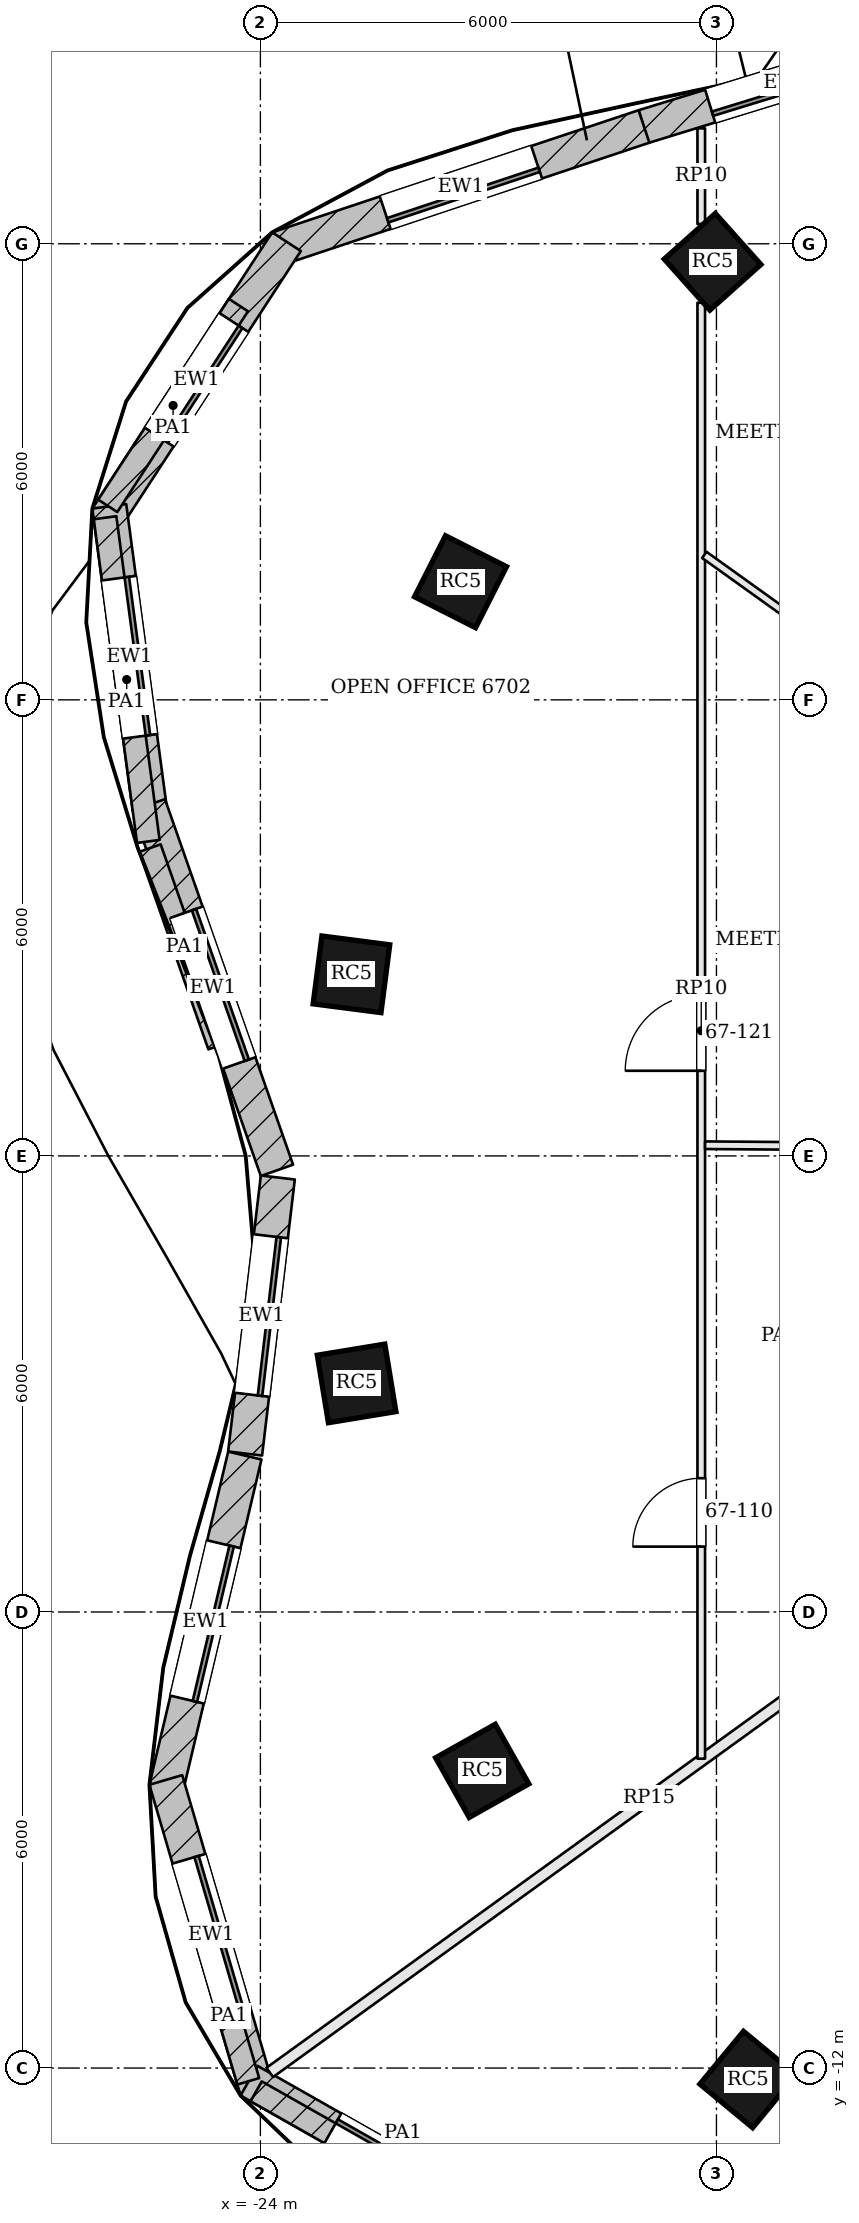
"""IFC4 building model, lengths in metres.
Left out: names, types, materials, properties, quantities, classifications, styles, units other than length and angle.
Written with IfcOpenShell. Run it as: python <this file> out.ifc"""

import sys

from ifc_helpers import new_model, si_unit, direction, frame, frame_2d, origin, origin_2d, place, context, subcontext, project, spatial, rectangle, extrude, element, fill, save


model = new_model("IFC4")
c1 = context("Model", 3, precision=1e-05, world=origin(), true_north=direction((0.0, 1.0)))
c2 = subcontext(c1, "Body", "Model", "MODEL_VIEW")
j1 = project(units=[si_unit("LENGTHUNIT", "METRE"), si_unit("PLANEANGLEUNIT", "RADIAN")], contexts=[c1])
p1 = place(None, origin())
s1 = spatial("IfcSite", under=j1, at=p1, CompositionType="ELEMENT")
p2 = place(p1, origin())
s2 = spatial("IfcBuilding", under=s1, at=p2, CompositionType="ELEMENT")
p3 = place(p2, frame((0.0, 0.0, 272.7)))
s3 = spatial("IfcBuildingStorey", under=s2, at=p3, CompositionType="ELEMENT", Elevation=272.7)
for number, where, z_axis, x_axis in (
    (1, (-18.051, 11.763, 0.0), (0.0, 0.0, 1.0), (-0.746, -0.666, 0.0)),
    (2, (-21.367, 7.554, 0.0), (0.0, 0.0, 1.0), (-0.452, -0.892, 0.0)),
    (3, (-22.802, 2.389, 0.0), (0.0, 0.0, 1.0), (-0.129, -0.992, 0.0)),
    (4, (-22.734, -2.993, 0.0), (0.0, 0.0, 1.0), (0.162, -0.987, 0.0)),
    (5, (-21.081, -8.09, 0.0), (0.0, 0.0, 1.0), (0.49, -0.872, 0.0)),
    (6, (-17.584, -12.151, 0.0), (0.0, 0.0, 1.0), (0.771, -0.637, 0.0)),
):
    element("IfcColumn", number, at=place(p3, frame(where, z_axis=z_axis, x_axis=x_axis)), inside=s3, PredefinedType="COLUMN", context=c2, shape_type="SweptSolid", body=[
        extrude(rectangle(XDim=0.9, YDim=0.9, at=origin_2d()), origin(), (0.0, 0.0, 1.0), 3.9),
    ])
p4 = place(p3, frame((-15.2, 14.698, 0.0), z_axis=(0.0, 0.0, 1.0), x_axis=(-0.955797807378, -0.294024746256, 0.0)))
e7 = element("IfcWall", 7, at=p4, inside=s3, PredefinedType="SOLIDWALL", context=c2, shape_type="SweptSolid", body=[
    extrude(rectangle(XDim=3.931, YDim=0.45, at=frame_2d((1.965, 0.0))), origin(), (0.0, 0.0, 1.0), 3.7),
])
p5 = place(p4, frame((0.915, 0.0, 0.9)))
e8 = element("IfcOpeningElement", 8, at=p5, cuts=e7, PredefinedType="OPENING", context=c2, shape_type="SweptSolid", body=[
    extrude(rectangle(XDim=2.1, YDim=2.3, at=frame_2d((1.05, 1.15))), frame((0.0, 0.235, 0.0), z_axis=(0.0, -1.0, 0.0), x_axis=(1.0, 0.0, 0.0)), (0.0, 0.0, 1.0), 0.47),
])
p6 = place(p3, frame((-18.954, 13.543, 0.0), z_axis=(0.0, 0.0, 1.0), x_axis=(-0.948673679101, -0.316256621402, 0.0)))
e9 = element("IfcWall", 9, at=p6, inside=s3, PredefinedType="SOLIDWALL", context=c2, shape_type="SweptSolid", body=[
    extrude(rectangle(XDim=5.076, YDim=0.45, at=frame_2d((2.538, 0.0))), origin(), (0.0, 0.0, 1.0), 3.7),
])
p7 = place(p6, frame((1.488, 0.0, 0.9)))
e10 = element("IfcOpeningElement", 10, at=p7, cuts=e9, PredefinedType="OPENING", context=c2, shape_type="SweptSolid", body=[
    extrude(rectangle(XDim=2.1, YDim=2.3, at=frame_2d((1.05, 1.15))), frame((0.0, 0.235, 0.0), z_axis=(0.0, -1.0, 0.0), x_axis=(1.0, 0.0, 0.0)), (0.0, 0.0, 1.0), 0.47),
])
p8 = place(p3, frame((-23.656, 12.027, 0.0), z_axis=(0.0, 0.0, 1.0), x_axis=(-0.545637310328, -0.838021435035, 0.0)))
e11 = element("IfcWall", 11, at=p8, inside=s3, PredefinedType="SOLIDWALL", context=c2, shape_type="SweptSolid", body=[
    extrude(rectangle(XDim=4.336, YDim=0.45, at=frame_2d((2.168, 0.0))), origin(), (0.0, 0.0, 1.0), 3.7),
])
p9 = place(p8, frame((1.268, 0.0, 0.9)))
e12 = element("IfcOpeningElement", 12, at=p9, cuts=e11, PredefinedType="OPENING", context=c2, shape_type="SweptSolid", body=[
    extrude(rectangle(XDim=1.8, YDim=2.3, at=frame_2d((0.9, 1.15))), frame((0.0, 0.235, 0.0), z_axis=(0.0, -1.0, 0.0), x_axis=(1.0, 0.0, 0.0)), (0.0, 0.0, 1.0), 0.47),
])
p10 = place(p3, frame((-25.988, 8.546, 0.0), z_axis=(0.0, 0.0, 1.0), x_axis=(0.132518904574, -0.991180477981, 0.0)))
e13 = element("IfcWall", 13, at=p10, inside=s3, PredefinedType="SOLIDWALL", context=c2, shape_type="SweptSolid", body=[
    extrude(rectangle(XDim=4.007, YDim=0.45, at=frame_2d((2.003, 0.0))), origin(), (0.0, 0.0, 1.0), 3.7),
])
p11 = place(p10, frame((0.954, 0.0, 0.9)))
e14 = element("IfcOpeningElement", 14, at=p11, cuts=e13, PredefinedType="OPENING", context=c2, shape_type="SweptSolid", body=[
    extrude(rectangle(XDim=2.1, YDim=2.3, at=frame_2d((1.05, 1.15))), frame((0.0, 0.235, 0.0), z_axis=(0.0, -1.0, 0.0), x_axis=(1.0, 0.0, 0.0)), (0.0, 0.0, 1.0), 0.47),
])
p12 = place(p3, frame((-25.468, 4.619, 0.0), z_axis=(0.0, 0.0, 1.0), x_axis=(0.330751636181, -0.943717836625, 0.0)))
e15 = element("IfcWall", 15, at=p12, inside=s3, PredefinedType="SOLIDWALL", context=c2, shape_type="SweptSolid", body=[
    extrude(rectangle(XDim=5.095, YDim=0.45, at=frame_2d((2.548, 0.0))), origin(), (0.0, 0.0, 1.0), 3.7),
])
p13 = place(p12, frame((1.498, 0.0, 0.9)))
e16 = element("IfcOpeningElement", 16, at=p13, cuts=e15, PredefinedType="OPENING", context=c2, shape_type="SweptSolid", body=[
    extrude(rectangle(XDim=2.1, YDim=2.3, at=frame_2d((1.05, 1.15))), frame((0.0, 0.235, 0.0), z_axis=(0.0, -1.0, 0.0), x_axis=(1.0, 0.0, 0.0)), (0.0, 0.0, 1.0), 0.47),
])
p14 = place(p3, frame((-23.771, -0.284, 0.0), z_axis=(0.0, 0.0, 1.0), x_axis=(-0.11770503458, -0.993048601446, 0.0)))
e17 = element("IfcWall", 17, at=p14, inside=s3, PredefinedType="SOLIDWALL", context=c2, shape_type="SweptSolid", body=[
    extrude(rectangle(XDim=3.657, YDim=0.45, at=frame_2d((1.828, 0.0))), origin(), (0.0, 0.0, 1.0), 3.7),
])
p15 = place(p14, frame((0.778, 0.0, 0.9)))
e18 = element("IfcOpeningElement", 18, at=p15, cuts=e17, PredefinedType="OPENING", context=c2, shape_type="SweptSolid", body=[
    extrude(rectangle(XDim=2.1, YDim=2.3, at=frame_2d((1.05, 1.15))), frame((0.0, 0.235, 0.0), z_axis=(0.0, -1.0, 0.0), x_axis=(1.0, 0.0, 0.0)), (0.0, 0.0, 1.0), 0.47),
])
p16 = place(p3, frame((-24.205, -3.942, 0.0), z_axis=(0.0, 0.0, 1.0), x_axis=(-0.230089011282, -0.973169587938, 0.0)))
e19 = element("IfcWall", 19, at=p16, inside=s3, PredefinedType="SOLIDWALL", context=c2, shape_type="SweptSolid", body=[
    extrude(rectangle(XDim=4.498, YDim=0.45, at=frame_2d((2.249, 0.0))), origin(), (0.0, 0.0, 1.0), 3.7),
])
p17 = place(p16, frame((1.199, 0.0, 0.9)))
e20 = element("IfcOpeningElement", 20, at=p17, cuts=e19, PredefinedType="OPENING", context=c2, shape_type="SweptSolid", body=[
    extrude(rectangle(XDim=2.1, YDim=2.3, at=frame_2d((1.05, 1.15))), frame((0.0, 0.235, 0.0), z_axis=(0.0, -1.0, 0.0), x_axis=(1.0, 0.0, 0.0)), (0.0, 0.0, 1.0), 0.47),
])
p18 = place(p3, frame((-25.244, -8.21, 0.0), z_axis=(0.0, 0.0, 1.0), x_axis=(0.281381418228, -0.95959600743, 0.0)))
e21 = element("IfcWall", 21, at=p18, inside=s3, PredefinedType="SOLIDWALL", context=c2, shape_type="SweptSolid", body=[
    extrude(rectangle(XDim=4.261, YDim=0.45, at=frame_2d((2.13, 0.0))), origin(), (0.0, 0.0, 1.0), 3.7),
])
p19 = place(p18, frame((1.081, 0.0, 0.9)))
e22 = element("IfcOpeningElement", 22, at=p19, cuts=e21, PredefinedType="OPENING", context=c2, shape_type="SweptSolid", body=[
    extrude(rectangle(XDim=2.1, YDim=2.3, at=frame_2d((1.05, 1.15))), frame((0.0, 0.235, 0.0), z_axis=(0.0, -1.0, 0.0), x_axis=(1.0, 0.0, 0.0)), (0.0, 0.0, 1.0), 0.47),
])
p20 = place(p3, frame((-24.15, -12.166, 0.0), z_axis=(0.0, 0.0, 1.0), x_axis=(0.869797051289, -0.493409656947, 0.0)))
e23 = element("IfcWall", 23, at=p20, inside=s3, PredefinedType="SOLIDWALL", context=c2, shape_type="SweptSolid", body=[
    extrude(rectangle(XDim=4.638, YDim=0.45, at=frame_2d((2.319, 0.0))), origin(), (0.0, 0.0, 1.0), 3.7),
])
p21 = place(p20, frame((1.269, 0.0, 0.9)))
e24 = element("IfcOpeningElement", 24, at=p21, cuts=e23, PredefinedType="OPENING", context=c2, shape_type="SweptSolid", body=[
    extrude(rectangle(XDim=2.1, YDim=2.3, at=frame_2d((1.05, 1.15))), frame((0.0, 0.235, 0.0), z_axis=(0.0, -1.0, 0.0), x_axis=(1.0, 0.0, 0.0)), (0.0, 0.0, 1.0), 0.47),
])
p22 = place(p3, frame((-24.289, 11.193, 3.9), z_axis=(0.0, 0.0, 1.0), x_axis=(-0.545639010101, -0.838020328307, 0.0)))
e25 = element("IfcWall", 25, at=p22, inside=s3, PredefinedType="PARAPET", context=c2, shape_type="SweptSolid", body=[
    extrude(rectangle(XDim=3.151, YDim=0.3, at=frame_2d((1.576, 0.0))), origin(), (0.0, 0.0, 1.0), 1.1),
])
p23 = place(p3, frame((-26.044, 8.396, 3.9), z_axis=(0.0, 0.0, 1.0), x_axis=(0.132506125812, -0.991182186393, 0.0)))
e26 = element("IfcWall", 26, at=p23, inside=s3, PredefinedType="PARAPET", context=c2, shape_type="SweptSolid", body=[
    extrude(rectangle(XDim=4.297, YDim=0.3, at=frame_2d((2.148, 0.0))), origin(), (0.0, 0.0, 1.0), 1.1),
])
p24 = place(p3, frame((-25.453, 4.049, 3.9), z_axis=(0.0, 0.0, 1.0), x_axis=(0.330796777865, -0.943702014279, 0.0)))
e27 = element("IfcWall", 27, at=p24, inside=s3, PredefinedType="PARAPET", context=c2, shape_type="SweptSolid", body=[
    extrude(rectangle(XDim=2.753, YDim=0.3, at=frame_2d((1.376, 0.0))), origin(), (0.0, 0.0, 1.0), 1.1),
])
p25 = place(p3, frame((-24.666, -10.449, 3.9), z_axis=(0.0, 0.0, 1.0), x_axis=(0.281438565612, -0.95957924831, 0.0)))
e28 = element("IfcWall", 28, at=p25, inside=s3, PredefinedType="PARAPET", context=c2, shape_type="SweptSolid", body=[
    extrude(rectangle(XDim=1.798, YDim=0.3, at=frame_2d((0.899, 0.0))), origin(), (0.0, 0.0, 1.0), 1.1),
])
p26 = place(p3, frame((-24.055, -12.306, 3.9), z_axis=(0.0, 0.0, 1.0), x_axis=(0.86982311217, -0.493363713234, 0.0)))
e29 = element("IfcWall", 29, at=p26, inside=s3, PredefinedType="PARAPET", context=c2, shape_type="SweptSolid", body=[
    extrude(rectangle(XDim=4.438, YDim=0.3, at=frame_2d((2.219, 0.0))), origin(), (0.0, 0.0, 1.0), 1.1),
])
p27 = place(p3, frame((-23.877, -12.058, 0.0), z_axis=(0.0, 0.0, 1.0), x_axis=(0.810464316252, 0.585788009506, 0.0)))
e30 = element("IfcWall", 30, at=p27, inside=s3, PredefinedType="PARTITIONING", context=c2, shape_type="SweptSolid", body=[
    extrude(rectangle(XDim=12.315, YDim=0.15, at=frame_2d((6.157, 0.0))), origin(), (0.0, 0.0, 1.0), 3.198),
])
p28 = place(p3, frame((-18.2, -7.93, 0.0), z_axis=(0.0, 0.0, 1.0), x_axis=(0.0, 1.0, 0.0)))
e31 = element("IfcWall", 31, at=p28, inside=s3, PredefinedType="PARTITIONING", context=c2, shape_type="SweptSolid", body=[
    extrude(rectangle(XDim=19.154, YDim=0.1, at=frame_2d((9.577, 0.0))), origin(), (0.0, 0.0, 1.0), 3.184),
])
p29 = place(p28, frame((2.79, 0.0, 0.0)))
e32 = element("IfcOpeningElement", 32, at=p29, cuts=e31, PredefinedType="OPENING", context=c2, shape_type="SweptSolid", body=[
    extrude(rectangle(XDim=0.9, YDim=2.1, at=frame_2d((0.45, 1.05))), frame((0.0, 0.06, 0.0), z_axis=(0.0, -1.0, 0.0), x_axis=(1.0, 0.0, 0.0)), (0.0, 0.0, 1.0), 0.12),
])
p30 = place(p28, frame((9.05, 0.0, 0.0)))
e33 = element("IfcOpeningElement", 33, at=p30, cuts=e31, PredefinedType="OPENING", context=c2, shape_type="SweptSolid", body=[
    extrude(rectangle(XDim=1.0, YDim=2.4, at=frame_2d((0.5, 1.2))), frame((0.0, 0.06, 0.0), z_axis=(0.0, -1.0, 0.0), x_axis=(1.0, 0.0, 0.0)), (0.0, 0.0, 1.0), 0.12),
])
p31 = place(p3, frame((-18.2, 12.26, 0.0), z_axis=(0.0, 0.0, 1.0), x_axis=(0.0, 1.0, 0.0)))
e34 = element("IfcWall", 34, at=p31, inside=s3, PredefinedType="PARTITIONING", context=c2, shape_type="SweptSolid", body=[
    extrude(rectangle(XDim=1.259, YDim=0.1, at=frame_2d((0.629, 0.0))), origin(), (0.0, 0.0, 1.0), 3.184),
])
p32 = place(p3, frame((-14.861, 5.543, 0.0), z_axis=(0.0, 0.0, 1.0), x_axis=(-0.812793388771, 0.582552063913, 0.0)))
e35 = element("IfcWall", 35, at=p32, inside=s3, PredefinedType="PARTITIONING", context=c2, shape_type="SweptSolid", body=[
    extrude(rectangle(XDim=4.058, YDim=0.1, at=frame_2d((2.029, 0.0))), origin(), (0.0, 0.0, 1.0), 3.184),
])
p33 = place(p3, frame((-14.875, 0.116, 0.0), z_axis=(0.0, 0.0, 1.0), x_axis=(-0.999972213407, 0.007454690722, 0.0)))
e36 = element("IfcWall", 36, at=p33, inside=s3, PredefinedType="PARTITIONING", context=c2, shape_type="SweptSolid", body=[
    extrude(rectangle(XDim=3.275, YDim=0.1, at=frame_2d((1.637, 0.0))), origin(), (0.0, 0.0, 1.0), 3.184),
])
p34 = place(p5, origin())
e37 = element("IfcWindow", 37, at=p34, inside=s3, PartitioningType="SINGLE_PANEL", PredefinedType="WINDOW", context=c2, shape_type="SweptSolid", body=[
    extrude(rectangle(XDim=2.1, YDim=2.3, at=frame_2d((1.05, 1.15))), frame((0.0, 0.135, 0.0), z_axis=(0.0, -1.0, 0.0), x_axis=(1.0, 0.0, 0.0)), (0.0, 0.0, 1.0), 0.06),
])
fill(e8, e37)
p35 = place(p7, origin())
e38 = element("IfcWindow", 38, at=p35, inside=s3, PartitioningType="SINGLE_PANEL", PredefinedType="WINDOW", context=c2, shape_type="SweptSolid", body=[
    extrude(rectangle(XDim=2.1, YDim=2.3, at=frame_2d((1.05, 1.15))), frame((0.0, 0.135, 0.0), z_axis=(0.0, -1.0, 0.0), x_axis=(1.0, 0.0, 0.0)), (0.0, 0.0, 1.0), 0.06),
])
fill(e10, e38)
p36 = place(p9, origin())
e39 = element("IfcWindow", 39, at=p36, inside=s3, PartitioningType="SINGLE_PANEL", PredefinedType="WINDOW", context=c2, shape_type="SweptSolid", body=[
    extrude(rectangle(XDim=1.8, YDim=2.3, at=frame_2d((0.9, 1.15))), frame((0.0, 0.135, 0.0), z_axis=(0.0, -1.0, 0.0), x_axis=(1.0, 0.0, 0.0)), (0.0, 0.0, 1.0), 0.06),
])
fill(e12, e39)
p37 = place(p11, origin())
e40 = element("IfcWindow", 40, at=p37, inside=s3, PartitioningType="SINGLE_PANEL", PredefinedType="WINDOW", context=c2, shape_type="SweptSolid", body=[
    extrude(rectangle(XDim=2.1, YDim=2.3, at=frame_2d((1.05, 1.15))), frame((0.0, 0.135, 0.0), z_axis=(0.0, -1.0, 0.0), x_axis=(1.0, 0.0, 0.0)), (0.0, 0.0, 1.0), 0.06),
])
fill(e14, e40)
p38 = place(p13, origin())
e41 = element("IfcWindow", 41, at=p38, inside=s3, PartitioningType="SINGLE_PANEL", PredefinedType="WINDOW", context=c2, shape_type="SweptSolid", body=[
    extrude(rectangle(XDim=2.1, YDim=2.3, at=frame_2d((1.05, 1.15))), frame((0.0, 0.135, 0.0), z_axis=(0.0, -1.0, 0.0), x_axis=(1.0, 0.0, 0.0)), (0.0, 0.0, 1.0), 0.06),
])
fill(e16, e41)
p39 = place(p15, origin())
e42 = element("IfcWindow", 42, at=p39, inside=s3, PartitioningType="SINGLE_PANEL", PredefinedType="WINDOW", context=c2, shape_type="SweptSolid", body=[
    extrude(rectangle(XDim=2.1, YDim=2.3, at=frame_2d((1.05, 1.15))), frame((0.0, 0.135, 0.0), z_axis=(0.0, -1.0, 0.0), x_axis=(1.0, 0.0, 0.0)), (0.0, 0.0, 1.0), 0.06),
])
fill(e18, e42)
p40 = place(p17, origin())
e43 = element("IfcWindow", 43, at=p40, inside=s3, PartitioningType="SINGLE_PANEL", PredefinedType="WINDOW", context=c2, shape_type="SweptSolid", body=[
    extrude(rectangle(XDim=2.1, YDim=2.3, at=frame_2d((1.05, 1.15))), frame((0.0, 0.135, 0.0), z_axis=(0.0, -1.0, 0.0), x_axis=(1.0, 0.0, 0.0)), (0.0, 0.0, 1.0), 0.06),
])
fill(e20, e43)
p41 = place(p19, origin())
e44 = element("IfcWindow", 44, at=p41, inside=s3, PartitioningType="SINGLE_PANEL", PredefinedType="WINDOW", context=c2, shape_type="SweptSolid", body=[
    extrude(rectangle(XDim=2.1, YDim=2.3, at=frame_2d((1.05, 1.15))), frame((0.0, 0.135, 0.0), z_axis=(0.0, -1.0, 0.0), x_axis=(1.0, 0.0, 0.0)), (0.0, 0.0, 1.0), 0.06),
])
fill(e22, e44)
p42 = place(p21, origin())
e45 = element("IfcWindow", 45, at=p42, inside=s3, PartitioningType="SINGLE_PANEL", PredefinedType="WINDOW", context=c2, shape_type="SweptSolid", body=[
    extrude(rectangle(XDim=2.1, YDim=2.3, at=frame_2d((1.05, 1.15))), frame((0.0, 0.135, 0.0), z_axis=(0.0, -1.0, 0.0), x_axis=(1.0, 0.0, 0.0)), (0.0, 0.0, 1.0), 0.06),
])
fill(e24, e45)
p43 = place(p29, origin())
e46 = element("IfcDoor", 46, at=p43, inside=s3, OperationType="SINGLE_SWING_LEFT", PredefinedType="DOOR", context=c2, shape_type="SweptSolid", body=[
    extrude(rectangle(XDim=0.9, YDim=2.1, at=frame_2d((0.45, 1.05))), frame((0.0, 0.025, 0.0), z_axis=(0.0, -1.0, 0.0), x_axis=(1.0, 0.0, 0.0)), (0.0, 0.0, 1.0), 0.05),
])
fill(e32, e46)
p44 = place(p30, origin())
e47 = element("IfcDoor", 47, at=p44, inside=s3, OperationType="SINGLE_SWING_LEFT", PredefinedType="DOOR", context=c2, shape_type="SweptSolid", body=[
    extrude(rectangle(XDim=1.0, YDim=2.4, at=frame_2d((0.5, 1.2))), frame((0.0, 0.025, 0.0), z_axis=(0.0, -1.0, 0.0), x_axis=(1.0, 0.0, 0.0)), (0.0, 0.0, 1.0), 0.05),
])
fill(e33, e47)
save(model, sys.argv[1])
